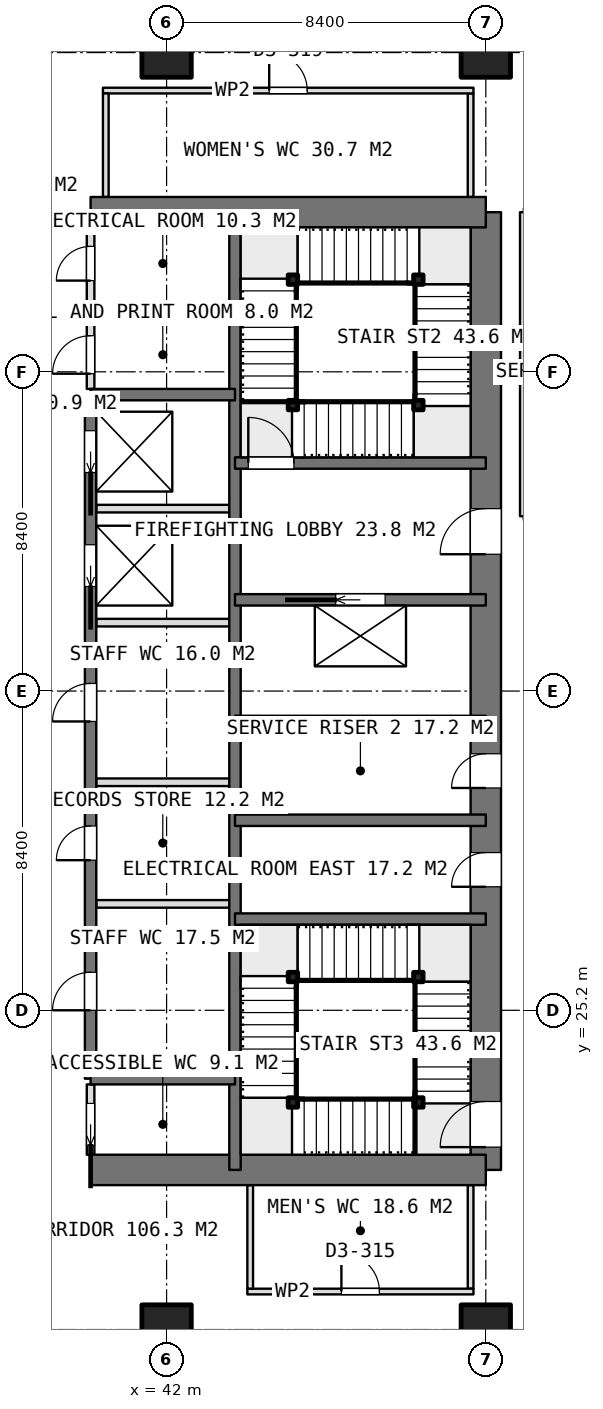
"""IFC4 building model, lengths in metres.
Left out: names, types, materials, properties, quantities, classifications, styles, units other than length and angle.
Written with IfcOpenShell. Run it as: python <this file> out.ifc"""

import sys

from ifc_helpers import new_model, si_unit, direction, frame, frame_2d, origin, origin_2d, place, context, subcontext, project, spatial, rectangle, extrude, element, fill, save


model = new_model("IFC4")
c1 = context("Model", 3, precision=1e-05, world=origin(), true_north=direction((0.0, 1.0)))
c2 = subcontext(c1, "Body", "Model", "MODEL_VIEW")
j1 = project(units=[si_unit("LENGTHUNIT", "METRE"), si_unit("PLANEANGLEUNIT", "RADIAN")], contexts=[c1])
p1 = place(None, origin())
s1 = spatial("IfcSite", under=j1, at=p1, CompositionType="ELEMENT")
p2 = place(p1, origin())
s2 = spatial("IfcBuilding", under=s1, at=p2, CompositionType="ELEMENT")
p3 = place(p2, frame((0.0, 0.0, 291.35)))
s3 = spatial("IfcBuildingStorey", under=s2, at=p3, CompositionType="ELEMENT", Elevation=291.35)
for number, where, z_axis, x_axis in (
    (1, (40.0, 21.0, 0.0), (0.0, 0.0, 1.0), (1.0, 0.0, 0.0)),
    (2, (40.0, 46.2, 0.0), (0.0, 0.0, 1.0), (1.0, 0.0, 0.0)),
):
    element("IfcWall", number, at=place(p3, frame(where, z_axis=z_axis, x_axis=x_axis)), inside=s3, PredefinedType="SHEAR", context=c2, shape_type="SweptSolid", body=[
        extrude(rectangle(XDim=10.4, YDim=0.8, at=frame_2d((5.2, 0.0))), origin(), (0.0, 0.0, 1.0), 5.4),
    ])
p4 = place(p3, frame((50.4, 21.0, 0.0), z_axis=(0.0, 0.0, 1.0), x_axis=(0.0, 1.0, 0.0)))
e3 = element("IfcWall", 3, at=p4, inside=s3, PredefinedType="SHEAR", context=c2, shape_type="SweptSolid", body=[
    extrude(rectangle(XDim=25.2, YDim=0.8, at=frame_2d((12.6, 0.0))), origin(), (0.0, 0.0, 1.0), 5.4),
])
p5 = place(p4, frame((16.2, 0.0, 0.0)))
e4 = element("IfcOpeningElement", 4, at=p5, cuts=e3, PredefinedType="OPENING", context=c2, shape_type="SweptSolid", body=[
    extrude(rectangle(XDim=1.2, YDim=2.1, at=frame_2d((0.6, 1.05))), frame((0.0, 0.41, 0.0), z_axis=(0.0, -1.0, 0.0), x_axis=(1.0, 0.0, 0.0)), (0.0, 0.0, 1.0), 0.82),
])
p6 = place(p4, frame((10.05, 0.0, 0.0)))
e5 = element("IfcOpeningElement", 5, at=p6, cuts=e3, PredefinedType="OPENING", context=c2, shape_type="SweptSolid", body=[
    extrude(rectangle(XDim=0.9, YDim=2.1, at=frame_2d((0.45, 1.05))), frame((0.0, 0.41, 0.0), z_axis=(0.0, -1.0, 0.0), x_axis=(1.0, 0.0, 0.0)), (0.0, 0.0, 1.0), 0.82),
])
p7 = place(p4, frame((7.45, 0.0, 0.0)))
e6 = element("IfcOpeningElement", 6, at=p7, cuts=e3, PredefinedType="OPENING", context=c2, shape_type="SweptSolid", body=[
    extrude(rectangle(XDim=0.9, YDim=2.1, at=frame_2d((0.45, 1.05))), frame((0.0, 0.41, 0.0), z_axis=(0.0, -1.0, 0.0), x_axis=(1.0, 0.0, 0.0)), (0.0, 0.0, 1.0), 0.82),
])
p8 = place(p4, frame((0.6, 0.0, 0.0)))
e7 = element("IfcOpeningElement", 7, at=p8, cuts=e3, PredefinedType="OPENING", context=c2, shape_type="SweptSolid", body=[
    extrude(rectangle(XDim=1.2, YDim=2.1, at=frame_2d((0.6, 1.05))), frame((0.0, 0.41, 0.0), z_axis=(0.0, -1.0, 0.0), x_axis=(1.0, 0.0, 0.0)), (0.0, 0.0, 1.0), 0.82),
])
p9 = place(p3, frame((43.8, 21.0, 0.0), z_axis=(0.0, 0.0, 1.0), x_axis=(0.0, 1.0, 0.0)))
e8 = element("IfcWall", 8, at=p9, inside=s3, PredefinedType="SHEAR", context=c2, shape_type="SweptSolid", body=[
    extrude(rectangle(XDim=25.2, YDim=0.3, at=frame_2d((12.6, 0.0))), origin(), (0.0, 0.0, 1.0), 5.4),
])
p10 = place(p3, frame((40.0, 23.4, 0.0), z_axis=(0.0, 0.0, 1.0), x_axis=(0.0, 1.0, 0.0)))
e9 = element("IfcWall", 9, at=p10, inside=s3, PredefinedType="SHEAR", context=c2, shape_type="SweptSolid", body=[
    extrude(rectangle(XDim=18.0, YDim=0.3, at=frame_2d((9.0, 0.0))), origin(), (0.0, 0.0, 1.0), 5.4),
])
p11 = place(p10, frame((1.8, 0.0, 0.0)))
e10 = element("IfcOpeningElement", 10, at=p11, cuts=e9, PredefinedType="OPENING", context=c2, shape_type="SweptSolid", body=[
    extrude(rectangle(XDim=1.0, YDim=2.1, at=frame_2d((0.5, 1.05))), frame((0.0, 0.16, 0.0), z_axis=(0.0, -1.0, 0.0), x_axis=(1.0, 0.0, 0.0)), (0.0, 0.0, 1.0), 0.32),
])
p12 = place(p10, frame((5.75, 0.0, 0.0)))
e11 = element("IfcOpeningElement", 11, at=p12, cuts=e9, PredefinedType="OPENING", context=c2, shape_type="SweptSolid", body=[
    extrude(rectangle(XDim=0.9, YDim=2.1, at=frame_2d((0.45, 1.05))), frame((0.0, 0.16, 0.0), z_axis=(0.0, -1.0, 0.0), x_axis=(1.0, 0.0, 0.0)), (0.0, 0.0, 1.0), 0.32),
])
p13 = place(p10, frame((9.4, 0.0, 0.0)))
e12 = element("IfcOpeningElement", 12, at=p13, cuts=e9, PredefinedType="OPENING", context=c2, shape_type="SweptSolid", body=[
    extrude(rectangle(XDim=1.0, YDim=2.1, at=frame_2d((0.5, 1.05))), frame((0.0, 0.16, 0.0), z_axis=(0.0, -1.0, 0.0), x_axis=(1.0, 0.0, 0.0)), (0.0, 0.0, 1.0), 0.32),
])
p14 = place(p10, frame((12.95, 0.0, 0.0)))
e13 = element("IfcOpeningElement", 13, at=p14, cuts=e9, PredefinedType="OPENING", context=c2, shape_type="SweptSolid", body=[
    extrude(rectangle(XDim=1.1, YDim=2.1, at=frame_2d((0.55, 1.05))), frame((0.0, 0.16, 0.0), z_axis=(0.0, -1.0, 0.0), x_axis=(1.0, 0.0, 0.0)), (0.0, 0.0, 1.0), 0.32),
])
p15 = place(p10, frame((15.95, 0.0, 0.0)))
e14 = element("IfcOpeningElement", 14, at=p15, cuts=e9, PredefinedType="OPENING", context=c2, shape_type="SweptSolid", body=[
    extrude(rectangle(XDim=1.1, YDim=2.1, at=frame_2d((0.55, 1.05))), frame((0.0, 0.16, 0.0), z_axis=(0.0, -1.0, 0.0), x_axis=(1.0, 0.0, 0.0)), (0.0, 0.0, 1.0), 0.32),
])
for number, where, z_axis, x_axis in (
    (15, (40.0, 23.4, 0.0), (0.0, 0.0, 1.0), (1.0, 0.0, 0.0)),
    (16, (40.0, 41.4, 0.0), (0.0, 0.0, 1.0), (1.0, 0.0, 0.0)),
):
    element("IfcWall", number, at=place(p3, frame(where, z_axis=z_axis, x_axis=x_axis)), inside=s3, PredefinedType="SHEAR", context=c2, shape_type="SweptSolid", body=[
        extrude(rectangle(XDim=3.8, YDim=0.3, at=frame_2d((1.9, 0.0))), origin(), (0.0, 0.0, 1.0), 5.4),
    ])
for number, where, z_axis, x_axis in (
    (17, (43.8, 27.6, 0.0), (0.0, 0.0, 1.0), (1.0, 0.0, 0.0)),
    (18, (43.8, 30.2, 0.0), (0.0, 0.0, 1.0), (1.0, 0.0, 0.0)),
    (19, (43.8, 32.8, 0.0), (0.0, 0.0, 1.0), (1.0, 0.0, 0.0)),
):
    element("IfcWall", number, at=place(p3, frame(where, z_axis=z_axis, x_axis=x_axis)), inside=s3, PredefinedType="SHEAR", context=c2, shape_type="SweptSolid", body=[
        extrude(rectangle(XDim=6.6, YDim=0.3, at=frame_2d((3.3, 0.0))), origin(), (0.0, 0.0, 1.0), 5.4),
    ])
p16 = place(p3, frame((43.8, 36.0, 0.0), z_axis=(0.0, 0.0, 1.0), x_axis=(1.0, 0.0, 0.0)))
e20 = element("IfcWall", 20, at=p16, inside=s3, PredefinedType="SHEAR", context=c2, shape_type="SweptSolid", body=[
    extrude(rectangle(XDim=6.6, YDim=0.3, at=frame_2d((3.3, 0.0))), origin(), (0.0, 0.0, 1.0), 5.4),
])
p17 = place(p16, frame((2.65, 0.0, 0.0)))
e21 = element("IfcOpeningElement", 21, at=p17, cuts=e20, PredefinedType="OPENING", context=c2, shape_type="SweptSolid", body=[
    extrude(rectangle(XDim=1.3, YDim=2.1, at=frame_2d((0.65, 1.05))), frame((0.0, 0.16, 0.0), z_axis=(0.0, -1.0, 0.0), x_axis=(1.0, 0.0, 0.0)), (0.0, 0.0, 1.0), 0.32),
])
p18 = place(p3, frame((43.8, 39.6, 0.0), z_axis=(0.0, 0.0, 1.0), x_axis=(1.0, 0.0, 0.0)))
e22 = element("IfcWall", 22, at=p18, inside=s3, PredefinedType="SHEAR", context=c2, shape_type="SweptSolid", body=[
    extrude(rectangle(XDim=6.6, YDim=0.3, at=frame_2d((3.3, 0.0))), origin(), (0.0, 0.0, 1.0), 5.4),
])
p19 = place(p18, frame((0.35, 0.0, 0.0)))
e23 = element("IfcOpeningElement", 23, at=p19, cuts=e22, PredefinedType="OPENING", context=c2, shape_type="SweptSolid", body=[
    extrude(rectangle(XDim=1.2, YDim=2.1, at=frame_2d((0.6, 1.05))), frame((0.0, 0.16, 0.0), z_axis=(0.0, -1.0, 0.0), x_axis=(1.0, 0.0, 0.0)), (0.0, 0.0, 1.0), 0.32),
])
for number, where, z_axis, x_axis in (
    (24, (42.0, 16.8, 0.0), (0.0, 0.0, 1.0), (1.0, 0.0, 0.0)),
    (25, (42.0, 50.4, 0.0), (0.0, 0.0, 1.0), (1.0, 0.0, 0.0)),
    (26, (50.4, 16.8, 0.0), (0.0, 0.0, 1.0), (1.0, 0.0, 0.0)),
    (27, (50.4, 50.4, 0.0), (0.0, 0.0, 1.0), (1.0, 0.0, 0.0)),
):
    element("IfcColumn", number, at=place(p3, frame(where, z_axis=z_axis, x_axis=x_axis)), inside=s3, PredefinedType="COLUMN", context=c2, shape_type="SweptSolid", body=[
        extrude(rectangle(XDim=1.3, YDim=1.3, at=origin_2d()), origin(), (0.0, 0.0, 1.0), 5.4),
    ])
for number, where, z_axis, x_axis in (
    (28, (40.15, 35.4, 0.0), (0.0, 0.0, 1.0), (1.0, 0.0, 0.0)),
    (29, (40.15, 38.4, 0.0), (0.0, 0.0, 1.0), (1.0, 0.0, 0.0)),
):
    element("IfcWall", number, at=place(p3, frame(where, z_axis=z_axis, x_axis=x_axis)), inside=s3, PredefinedType="PARTITIONING", context=c2, shape_type="SweptSolid", body=[
        extrude(rectangle(XDim=3.5, YDim=0.2, at=frame_2d((1.75, 0.0))), origin(), (0.0, 0.0, 1.0), 5.1),
    ])
p20 = place(p3, frame((40.0, 21.4, 0.0), z_axis=(0.0, 0.0, 1.0), x_axis=(0.0, 1.0, 0.0)))
e30 = element("IfcWall", 30, at=p20, inside=s3, PredefinedType="PARTITIONING", context=c2, shape_type="SweptSolid", body=[
    extrude(rectangle(XDim=1.85, YDim=0.2, at=frame_2d((0.925, 0.0))), origin(), (0.0, 0.0, 1.0), 5.1),
])
p21 = place(p20, frame((0.25, 0.0, 0.0)))
e31 = element("IfcOpeningElement", 31, at=p21, cuts=e30, PredefinedType="OPENING", context=c2, shape_type="SweptSolid", body=[
    extrude(rectangle(XDim=1.1, YDim=2.1, at=frame_2d((0.55, 1.05))), frame((0.0, 0.11, 0.0), z_axis=(0.0, -1.0, 0.0), x_axis=(1.0, 0.0, 0.0)), (0.0, 0.0, 1.0), 0.22),
])
p22 = place(p3, frame((40.0, 41.55, 0.0), z_axis=(0.0, 0.0, 1.0), x_axis=(0.0, 1.0, 0.0)))
e32 = element("IfcWall", 32, at=p22, inside=s3, PredefinedType="PARTITIONING", context=c2, shape_type="SweptSolid", body=[
    extrude(rectangle(XDim=4.25, YDim=0.2, at=frame_2d((2.125, 0.0))), origin(), (0.0, 0.0, 1.0), 5.1),
])
p23 = place(p22, frame((2.85, 0.0, 0.0)))
e33 = element("IfcOpeningElement", 33, at=p23, cuts=e32, PredefinedType="OPENING", context=c2, shape_type="SweptSolid", body=[
    extrude(rectangle(XDim=0.9, YDim=2.1, at=frame_2d((0.45, 1.05))), frame((0.0, 0.11, 0.0), z_axis=(0.0, -1.0, 0.0), x_axis=(1.0, 0.0, 0.0)), (0.0, 0.0, 1.0), 0.22),
])
p24 = place(p22, frame((0.4, 0.0, 0.0)))
e34 = element("IfcOpeningElement", 34, at=p24, cuts=e32, PredefinedType="OPENING", context=c2, shape_type="SweptSolid", body=[
    extrude(rectangle(XDim=1.0, YDim=2.1, at=frame_2d((0.5, 1.05))), frame((0.0, 0.11, 0.0), z_axis=(0.0, -1.0, 0.0), x_axis=(1.0, 0.0, 0.0)), (0.0, 0.0, 1.0), 0.22),
])
for number, where, z_axis, x_axis in (
    (35, (40.15, 28.0, 0.0), (0.0, 0.0, 1.0), (1.0, 0.0, 0.0)),
    (36, (40.15, 31.2, 0.0), (0.0, 0.0, 1.0), (1.0, 0.0, 0.0)),
):
    element("IfcWall", number, at=place(p3, frame(where, z_axis=z_axis, x_axis=x_axis)), inside=s3, PredefinedType="PARTITIONING", context=c2, shape_type="SweptSolid", body=[
        extrude(rectangle(XDim=3.5, YDim=0.2, at=frame_2d((1.75, 0.0))), origin(), (0.0, 0.0, 1.0), 5.1),
    ])
p25 = place(p3, frame((40.0, 43.5, 0.0), z_axis=(0.0, 0.0, 1.0), x_axis=(1.0, 0.0, 0.0)))
e37 = element("IfcWall", 37, at=p25, inside=s3, PredefinedType="PARTITIONING", context=c2, shape_type="SweptSolid", body=[
    extrude(rectangle(XDim=3.65, YDim=0.2, at=frame_2d((1.825, 0.0))), origin(), (0.0, 0.0, 1.0), 5.1),
])
p26 = place(p3, frame((40.325, 49.4, 0.0), z_axis=(0.0, 0.0, 1.0), x_axis=(1.0, 0.0, 0.0)))
e38 = element("IfcWall", 38, at=p26, inside=s3, PredefinedType="PARTITIONING", context=c2, shape_type="SweptSolid", body=[
    extrude(rectangle(XDim=9.75, YDim=0.15, at=frame_2d((4.875, 0.0))), origin(), (0.0, 0.0, 1.0), 5.1),
])
p27 = place(p26, frame((4.375, 0.0, 0.0)))
e39 = element("IfcOpeningElement", 39, at=p27, cuts=e38, PredefinedType="OPENING", context=c2, shape_type="SweptSolid", body=[
    extrude(rectangle(XDim=1.0, YDim=2.1, at=frame_2d((0.5, 1.05))), frame((0.0, 0.085, 0.0), z_axis=(0.0, -1.0, 0.0), x_axis=(1.0, 0.0, 0.0)), (0.0, 0.0, 1.0), 0.17),
])
for number, where, z_axis, x_axis in (
    (40, (40.4, 46.6, 0.0), (0.0, 0.0, 1.0), (0.0, 1.0, 0.0)),
    (41, (50.0, 46.6, 0.0), (0.0, 0.0, 1.0), (0.0, 1.0, 0.0)),
):
    element("IfcWall", number, at=place(p3, frame(where, z_axis=z_axis, x_axis=x_axis)), inside=s3, PredefinedType="PARTITIONING", context=c2, shape_type="SweptSolid", body=[
        extrude(rectangle(XDim=2.725, YDim=0.15, at=frame_2d((1.362, 0.0))), origin(), (0.0, 0.0, 1.0), 5.1),
    ])
p28 = place(p3, frame((44.125, 17.8, 0.0), z_axis=(0.0, 0.0, 1.0), x_axis=(1.0, 0.0, 0.0)))
e42 = element("IfcWall", 42, at=p28, inside=s3, PredefinedType="PARTITIONING", context=c2, shape_type="SweptSolid", body=[
    extrude(rectangle(XDim=5.95, YDim=0.15, at=frame_2d((2.975, 0.0))), origin(), (0.0, 0.0, 1.0), 5.1),
])
p29 = place(p28, frame((2.475, 0.0, 0.0)))
e43 = element("IfcOpeningElement", 43, at=p29, cuts=e42, PredefinedType="OPENING", context=c2, shape_type="SweptSolid", body=[
    extrude(rectangle(XDim=1.0, YDim=2.1, at=frame_2d((0.5, 1.05))), frame((0.0, 0.085, 0.0), z_axis=(0.0, -1.0, 0.0), x_axis=(1.0, 0.0, 0.0)), (0.0, 0.0, 1.0), 0.17),
])
for number, where, z_axis, x_axis in (
    (44, (44.2, 17.875, 0.0), (0.0, 0.0, 1.0), (0.0, 1.0, 0.0)),
    (45, (50.0, 17.875, 0.0), (0.0, 0.0, 1.0), (0.0, 1.0, 0.0)),
):
    element("IfcWall", number, at=place(p3, frame(where, z_axis=z_axis, x_axis=x_axis)), inside=s3, PredefinedType="PARTITIONING", context=c2, shape_type="SweptSolid", body=[
        extrude(rectangle(XDim=2.725, YDim=0.15, at=frame_2d((1.363, 0.0))), origin(), (0.0, 0.0, 1.0), 5.1),
    ])
p30 = place(p3, frame((51.4, 38.2, 0.0), z_axis=(0.0, 0.0, 1.0), x_axis=(0.0, 1.0, 0.0)))
e46 = element("IfcWall", 46, at=p30, inside=s3, PredefinedType="PARTITIONING", context=c2, shape_type="SweptSolid", body=[
    extrude(rectangle(XDim=8.0, YDim=0.2, at=frame_2d((4.0, 0.0))), origin(), (0.0, 0.0, 1.0), 5.1),
])
for number, where, z_axis, x_axis in (
    (47, (45.325, 41.125, 0.0), (0.0, 0.0, 1.0), (1.0, 0.0, 0.0)),
    (48, (45.325, 44.425, 0.0), (0.0, 0.0, 1.0), (1.0, 0.0, 0.0)),
    (49, (48.625, 44.425, 0.0), (0.0, 0.0, 1.0), (1.0, 0.0, 0.0)),
    (50, (48.625, 41.125, 0.0), (0.0, 0.0, 1.0), (1.0, 0.0, 0.0)),
    (51, (48.625, 22.775, 0.0), (0.0, 0.0, 1.0), (1.0, 0.0, 0.0)),
    (52, (45.325, 22.775, 0.0), (0.0, 0.0, 1.0), (1.0, 0.0, 0.0)),
    (53, (45.325, 26.075, 0.0), (0.0, 0.0, 1.0), (1.0, 0.0, 0.0)),
    (54, (48.625, 26.075, 0.0), (0.0, 0.0, 1.0), (1.0, 0.0, 0.0)),
):
    element("IfcColumn", number, at=place(p3, frame(where, z_axis=z_axis, x_axis=x_axis)), inside=s3, PredefinedType="COLUMN", context=c2, shape_type="SweptSolid", body=[
        extrude(rectangle(XDim=0.25, YDim=0.25, at=origin_2d()), origin(), (0.0, 0.0, 1.0), 5.4),
    ])
p31 = place(p5, origin())
e55 = element("IfcDoor", 55, at=p31, inside=s3, OperationType="SINGLE_SWING_LEFT", PredefinedType="DOOR", context=c2, shape_type="SweptSolid", body=[
    extrude(rectangle(XDim=1.2, YDim=2.1, at=frame_2d((0.6, 1.05))), frame((0.0, 0.025, 0.0), z_axis=(0.0, -1.0, 0.0), x_axis=(1.0, 0.0, 0.0)), (0.0, 0.0, 1.0), 0.05),
])
fill(e4, e55)
p32 = place(p6, origin())
e56 = element("IfcDoor", 56, at=p32, inside=s3, OperationType="SINGLE_SWING_LEFT", PredefinedType="DOOR", context=c2, shape_type="SweptSolid", body=[
    extrude(rectangle(XDim=0.9, YDim=2.1, at=frame_2d((0.45, 1.05))), frame((0.0, 0.025, 0.0), z_axis=(0.0, -1.0, 0.0), x_axis=(1.0, 0.0, 0.0)), (0.0, 0.0, 1.0), 0.05),
])
fill(e5, e56)
p33 = place(p7, origin())
e57 = element("IfcDoor", 57, at=p33, inside=s3, OperationType="SINGLE_SWING_LEFT", PredefinedType="DOOR", context=c2, shape_type="SweptSolid", body=[
    extrude(rectangle(XDim=0.9, YDim=2.1, at=frame_2d((0.45, 1.05))), frame((0.0, 0.025, 0.0), z_axis=(0.0, -1.0, 0.0), x_axis=(1.0, 0.0, 0.0)), (0.0, 0.0, 1.0), 0.05),
])
fill(e6, e57)
p34 = place(p21, origin())
e58 = element("IfcDoor", 58, at=p34, inside=s3, OperationType="SLIDING_TO_LEFT", PredefinedType="DOOR", context=c2, shape_type="SweptSolid", body=[
    extrude(rectangle(XDim=1.1, YDim=2.1, at=frame_2d((0.55, 1.05))), frame((0.0, 0.025, 0.0), z_axis=(0.0, -1.0, 0.0), x_axis=(1.0, 0.0, 0.0)), (0.0, 0.0, 1.0), 0.05),
])
fill(e31, e58)
p35 = place(p23, origin())
e59 = element("IfcDoor", 59, at=p35, inside=s3, OperationType="SINGLE_SWING_LEFT", PredefinedType="DOOR", context=c2, shape_type="SweptSolid", body=[
    extrude(rectangle(XDim=0.9, YDim=2.1, at=frame_2d((0.45, 1.05))), frame((0.0, 0.025, 0.0), z_axis=(0.0, -1.0, 0.0), x_axis=(1.0, 0.0, 0.0)), (0.0, 0.0, 1.0), 0.05),
])
fill(e33, e59)
p36 = place(p24, origin())
e60 = element("IfcDoor", 60, at=p36, inside=s3, OperationType="SINGLE_SWING_LEFT", PredefinedType="DOOR", context=c2, shape_type="SweptSolid", body=[
    extrude(rectangle(XDim=1.0, YDim=2.1, at=frame_2d((0.5, 1.05))), frame((0.0, 0.025, 0.0), z_axis=(0.0, -1.0, 0.0), x_axis=(1.0, 0.0, 0.0)), (0.0, 0.0, 1.0), 0.05),
])
fill(e34, e60)
p37 = place(p11, origin())
e61 = element("IfcDoor", 61, at=p37, inside=s3, OperationType="SINGLE_SWING_LEFT", PredefinedType="DOOR", context=c2, shape_type="SweptSolid", body=[
    extrude(rectangle(XDim=1.0, YDim=2.1, at=frame_2d((0.5, 1.05))), frame((0.0, 0.025, 0.0), z_axis=(0.0, -1.0, 0.0), x_axis=(1.0, 0.0, 0.0)), (0.0, 0.0, 1.0), 0.05),
])
fill(e10, e61)
p38 = place(p12, origin())
e62 = element("IfcDoor", 62, at=p38, inside=s3, OperationType="SINGLE_SWING_LEFT", PredefinedType="DOOR", context=c2, shape_type="SweptSolid", body=[
    extrude(rectangle(XDim=0.9, YDim=2.1, at=frame_2d((0.45, 1.05))), frame((0.0, 0.025, 0.0), z_axis=(0.0, -1.0, 0.0), x_axis=(1.0, 0.0, 0.0)), (0.0, 0.0, 1.0), 0.05),
])
fill(e11, e62)
p39 = place(p13, origin())
e63 = element("IfcDoor", 63, at=p39, inside=s3, OperationType="SINGLE_SWING_LEFT", PredefinedType="DOOR", context=c2, shape_type="SweptSolid", body=[
    extrude(rectangle(XDim=1.0, YDim=2.1, at=frame_2d((0.5, 1.05))), frame((0.0, 0.025, 0.0), z_axis=(0.0, -1.0, 0.0), x_axis=(1.0, 0.0, 0.0)), (0.0, 0.0, 1.0), 0.05),
])
fill(e12, e63)
p40 = place(p17, origin())
e64 = element("IfcDoor", 64, at=p40, inside=s3, OperationType="SLIDING_TO_LEFT", PredefinedType="USERDEFINED", context=c2, shape_type="SweptSolid", body=[
    extrude(rectangle(XDim=1.3, YDim=2.1, at=frame_2d((0.65, 1.05))), frame((0.0, 0.025, 0.0), z_axis=(0.0, -1.0, 0.0), x_axis=(1.0, 0.0, 0.0)), (0.0, 0.0, 1.0), 0.05),
])
fill(e21, e64)
p41 = place(p14, origin())
e65 = element("IfcDoor", 65, at=p41, inside=s3, OperationType="SLIDING_TO_LEFT", PredefinedType="USERDEFINED", context=c2, shape_type="SweptSolid", body=[
    extrude(rectangle(XDim=1.1, YDim=2.1, at=frame_2d((0.55, 1.05))), frame((0.0, 0.025, 0.0), z_axis=(0.0, -1.0, 0.0), x_axis=(1.0, 0.0, 0.0)), (0.0, 0.0, 1.0), 0.05),
])
fill(e13, e65)
p42 = place(p15, origin())
e66 = element("IfcDoor", 66, at=p42, inside=s3, OperationType="SLIDING_TO_LEFT", PredefinedType="USERDEFINED", context=c2, shape_type="SweptSolid", body=[
    extrude(rectangle(XDim=1.1, YDim=2.1, at=frame_2d((0.55, 1.05))), frame((0.0, 0.025, 0.0), z_axis=(0.0, -1.0, 0.0), x_axis=(1.0, 0.0, 0.0)), (0.0, 0.0, 1.0), 0.05),
])
fill(e14, e66)
p43 = place(p27, origin())
e67 = element("IfcDoor", 67, at=p43, inside=s3, OperationType="SINGLE_SWING_LEFT", PredefinedType="DOOR", context=c2, shape_type="SweptSolid", body=[
    extrude(rectangle(XDim=1.0, YDim=2.1, at=frame_2d((0.5, 1.05))), frame((0.0, 0.025, 0.0), z_axis=(0.0, -1.0, 0.0), x_axis=(1.0, 0.0, 0.0)), (0.0, 0.0, 1.0), 0.05),
])
fill(e39, e67)
p44 = place(p29, origin())
e68 = element("IfcDoor", 68, at=p44, inside=s3, OperationType="SINGLE_SWING_LEFT", PredefinedType="DOOR", context=c2, shape_type="SweptSolid", body=[
    extrude(rectangle(XDim=1.0, YDim=2.1, at=frame_2d((0.5, 1.05))), frame((0.0, 0.025, 0.0), z_axis=(0.0, -1.0, 0.0), x_axis=(1.0, 0.0, 0.0)), (0.0, 0.0, 1.0), 0.05),
])
fill(e43, e68)
p45 = place(p19, origin())
e69 = element("IfcDoor", 69, at=p45, inside=s3, OperationType="SINGLE_SWING_RIGHT", PredefinedType="DOOR", context=c2, shape_type="SweptSolid", body=[
    extrude(rectangle(XDim=1.2, YDim=2.1, at=frame_2d((0.6, 1.05))), frame((0.0, 0.025, 0.0), z_axis=(0.0, -1.0, 0.0), x_axis=(1.0, 0.0, 0.0)), (0.0, 0.0, 1.0), 0.05),
])
fill(e23, e69)
p46 = place(p8, origin())
e70 = element("IfcDoor", 70, at=p46, inside=s3, OperationType="SINGLE_SWING_RIGHT", PredefinedType="DOOR", context=c2, shape_type="SweptSolid", body=[
    extrude(rectangle(XDim=1.2, YDim=2.1, at=frame_2d((0.6, 1.05))), frame((0.0, 0.025, 0.0), z_axis=(0.0, -1.0, 0.0), x_axis=(1.0, 0.0, 0.0)), (0.0, 0.0, 1.0), 0.05),
])
fill(e7, e70)
save(model, sys.argv[1])
